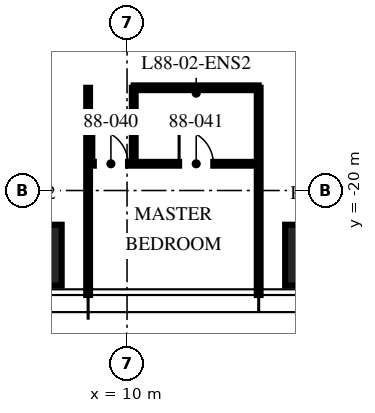
"""IFC4 building model, lengths in metres.
Left out: names, types, materials, properties, quantities, classifications, styles, units other than length and angle.
Written with IfcOpenShell. Run it as: python <this file> out.ifc"""

import sys

from ifc_helpers import new_model, si_unit, direction, frame, frame_2d, origin, origin_2d, place, context, subcontext, project, spatial, rectangle, extrude, element, fill, save


model = new_model("IFC4")
c1 = context("Model", 3, precision=1e-05, world=origin(), true_north=direction((0.0, 1.0)))
c2 = subcontext(c1, "Body", "Model", "MODEL_VIEW")
j1 = project(units=[si_unit("LENGTHUNIT", "METRE"), si_unit("PLANEANGLEUNIT", "RADIAN")], contexts=[c1])
p1 = place(None, origin())
s1 = spatial("IfcSite", under=j1, at=p1, CompositionType="ELEMENT")
p2 = place(p1, origin())
s2 = spatial("IfcBuilding", under=s1, at=p2, CompositionType="ELEMENT")
p3 = place(p2, frame((0.0, 0.0, 349.5)))
s3 = spatial("IfcBuildingStorey", under=s2, at=p3, CompositionType="ELEMENT", Elevation=349.5)
for number, where, z_axis, x_axis in (
    (1, (14.96, -21.7, 0.0), (0.0, 0.0, 1.0), (1.0, 0.0, 0.0)),
    (2, (7.48, -21.7, 0.0), (0.0, 0.0, 1.0), (1.0, 0.0, 0.0)),
):
    element("IfcColumn", number, at=place(p3, frame(where, z_axis=z_axis, x_axis=x_axis)), inside=s3, PredefinedType="COLUMN", context=c2, shape_type="SweptSolid", body=[
        extrude(rectangle(XDim=1.6, YDim=1.6, at=origin_2d()), origin(), (0.0, 0.0, 1.0), 3.75),
    ])
for number, where, z_axis, x_axis in (
    (3, (8.976, -17.296, 0.0), (0.0, 0.0, 1.0), (0.0, -1.0, 0.0)),
    (4, (13.464, -17.296, 0.0), (0.0, 0.0, 1.0), (0.0, -1.0, 0.0)),
):
    element("IfcWall", number, at=place(p3, frame(where, z_axis=z_axis, x_axis=x_axis)), inside=s3, PredefinedType="PARTITIONING", context=c2, shape_type="SweptSolid", body=[
        extrude(rectangle(XDim=5.454, YDim=0.1, at=frame_2d((2.727, 0.0))), origin(), (0.0, 0.0, 1.0), 2.85),
    ])
p4 = place(p3, frame((8.976, -19.296, 0.0), z_axis=(0.0, 0.0, 1.0), x_axis=(1.0, 0.0, 0.0)))
e5 = element("IfcWall", 5, at=p4, inside=s3, PredefinedType="PARTITIONING", context=c2, shape_type="SweptSolid", body=[
    extrude(rectangle(XDim=4.488, YDim=0.1, at=frame_2d((2.244, 0.0))), origin(), (0.0, 0.0, 1.0), 2.56),
])
p5 = place(p4, frame((0.15, 0.0, 0.0)))
e6 = element("IfcOpeningElement", 6, at=p5, cuts=e5, PredefinedType="OPENING", context=c2, shape_type="SweptSolid", body=[
    extrude(rectangle(XDim=0.9, YDim=2.1, at=frame_2d((0.45, 1.05))), frame((0.0, 0.06, 0.0), z_axis=(0.0, -1.0, 0.0), x_axis=(1.0, 0.0, 0.0)), (0.0, 0.0, 1.0), 0.12),
])
p6 = place(p4, frame((2.394, 0.0, 0.0)))
e7 = element("IfcOpeningElement", 7, at=p6, cuts=e5, PredefinedType="OPENING", context=c2, shape_type="SweptSolid", body=[
    extrude(rectangle(XDim=0.9, YDim=2.1, at=frame_2d((0.45, 1.05))), frame((0.0, 0.06, 0.0), z_axis=(0.0, -1.0, 0.0), x_axis=(1.0, 0.0, 0.0)), (0.0, 0.0, 1.0), 0.12),
])
p7 = place(p3, frame((10.176, -17.296, 0.0), z_axis=(0.0, 0.0, 1.0), x_axis=(0.0, -1.0, 0.0)))
e8 = element("IfcWall", 8, at=p7, inside=s3, PredefinedType="PARTITIONING", context=c2, shape_type="SweptSolid", body=[
    extrude(rectangle(XDim=2.0, YDim=0.1, at=frame_2d((1.0, 0.0))), origin(), (0.0, 0.0, 1.0), 3.45),
])
p8 = place(p3, frame((10.176, -17.296, 0.0), z_axis=(0.0, 0.0, 1.0), x_axis=(1.0, 0.0, 0.0)))
e9 = element("IfcWall", 9, at=p8, inside=s3, PredefinedType="PARTITIONING", context=c2, shape_type="SweptSolid", body=[
    extrude(rectangle(XDim=3.288, YDim=0.125, at=frame_2d((1.644, 0.0))), origin(), (0.0, 0.0, 1.0), 2.56),
])
p9 = place(p5, origin())
e10 = element("IfcDoor", 10, at=p9, inside=s3, OperationType="SINGLE_SWING_LEFT", PredefinedType="DOOR", context=c2, shape_type="SweptSolid", body=[
    extrude(rectangle(XDim=0.9, YDim=2.1, at=frame_2d((0.45, 1.05))), frame((0.0, 0.025, 0.0), z_axis=(0.0, -1.0, 0.0), x_axis=(1.0, 0.0, 0.0)), (0.0, 0.0, 1.0), 0.05),
])
fill(e6, e10)
p10 = place(p6, origin())
e11 = element("IfcDoor", 11, at=p10, inside=s3, OperationType="SINGLE_SWING_LEFT", PredefinedType="DOOR", context=c2, shape_type="SweptSolid", body=[
    extrude(rectangle(XDim=0.9, YDim=2.1, at=frame_2d((0.45, 1.05))), frame((0.0, 0.025, 0.0), z_axis=(0.0, -1.0, 0.0), x_axis=(1.0, 0.0, 0.0)), (0.0, 0.0, 1.0), 0.05),
])
fill(e7, e11)
save(model, sys.argv[1])
